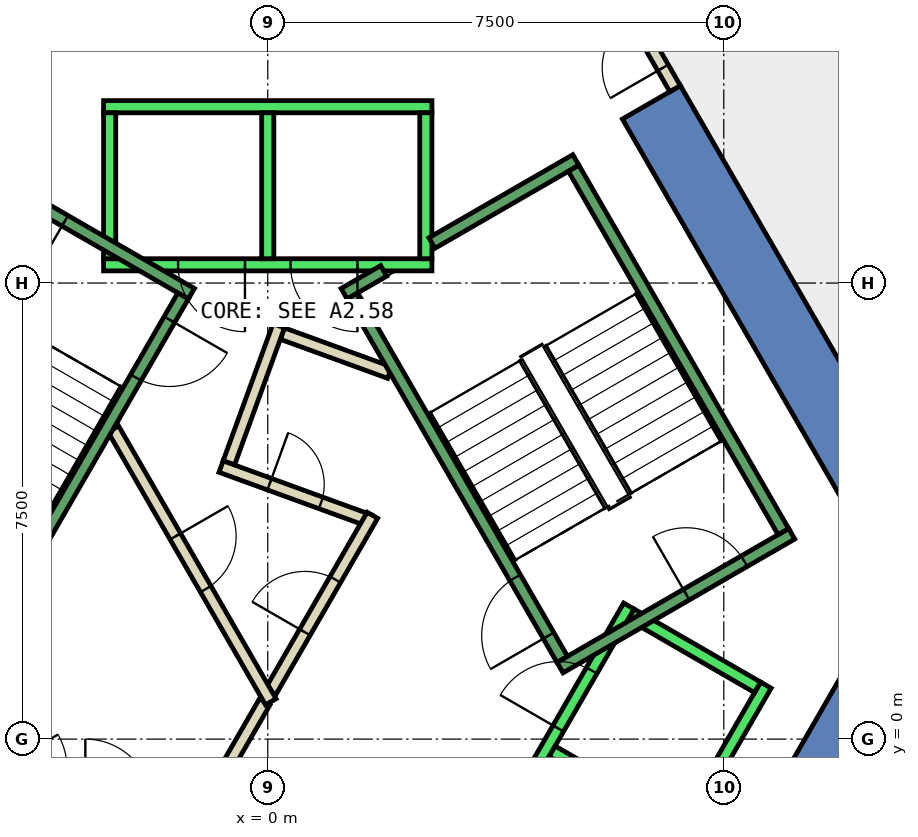
"""IFC4 building model, lengths in metres.
Left out: names, types, materials, properties, quantities, classifications, styles, units other than length and angle.
Written with IfcOpenShell. Run it as: python <this file> out.ifc"""

import sys

from ifc_helpers import new_model, si_unit, direction, frame, frame_2d, origin, place, context, subcontext, project, spatial, polyline, rectangle, outline, extrude, element, fill, save


model = new_model("IFC4")
c1 = context("Model", 3, precision=1e-05, world=origin(), true_north=direction((0.0, 1.0)))
c2 = subcontext(c1, "Body", "Model", "MODEL_VIEW")
j1 = project(units=[si_unit("LENGTHUNIT", "METRE"), si_unit("PLANEANGLEUNIT", "RADIAN")], contexts=[c1])
p1 = place(None, origin())
s1 = spatial("IfcSite", under=j1, at=p1, CompositionType="ELEMENT")
p2 = place(p1, origin())
s2 = spatial("IfcBuilding", under=s1, at=p2, CompositionType="ELEMENT")
p3 = place(p2, frame((0.0, 0.0, 273.8)))
s3 = spatial("IfcBuildingStorey", under=s2, at=p3, CompositionType="ELEMENT", Elevation=273.8)
p4 = place(p3, frame((0.0, 0.0, -0.34)))
e1 = element("IfcWall", 1, at=p4, inside=s3, PredefinedType="SHEAR", context=c2, shape_type="SweptSolid", body=[
    extrude(outline(polyline([(6.786, 10.747), (5.833, 10.197), (10.277, 2.5), (11.547, 2.5), (6.786, 10.747)])), origin(), (0.0, 0.0, 1.0), 3.6),
])
p5 = place(p3, frame((0.0, 0.0, -0.34)))
e2 = element("IfcWall", 2, at=p5, inside=s3, PredefinedType="SHEAR", context=c2, shape_type="SweptSolid", body=[
    extrude(outline(polyline([(5.774, -7.5), (11.547, 2.5), (10.277, 2.5), (5.138, -6.4), (5.774, -7.5)])), origin(), (0.0, 0.0, 1.0), 3.6),
])
p6 = place(p3, frame((2.005, 6.027, 0.0), z_axis=(0.0, 0.0, 1.0), x_axis=(-0.93978203596, 0.341774377167, 0.0)))
e3 = element("IfcWall", 3, at=p6, inside=s3, PredefinedType="PARTITIONING", context=c2, shape_type="SweptSolid", body=[
    extrude(rectangle(XDim=1.878, YDim=0.2, at=frame_2d((0.939, 0.0))), origin(), (0.0, 0.0, 1.0), 3.26),
])
p7 = place(p3, frame((0.181, 6.797, 0.0), z_axis=(0.0, 0.0, 1.0), x_axis=(-0.342020767299, -0.939692393678, 0.0)))
e4 = element("IfcWall", 4, at=p7, inside=s3, PredefinedType="PARTITIONING", context=c2, shape_type="SweptSolid", body=[
    extrude(rectangle(XDim=2.4, YDim=0.2, at=frame_2d((1.2, 0.0))), origin(), (0.0, 0.0, 1.0), 3.26),
])
p8 = place(p3, frame((-0.768, 4.482, 0.0), z_axis=(0.0, 0.0, 1.0), x_axis=(0.939664280748, -0.342097996905, 0.0)))
e5 = element("IfcWall", 5, at=p8, inside=s3, PredefinedType="PARTITIONING", context=c2, shape_type="SweptSolid", body=[
    extrude(rectangle(XDim=2.595, YDim=0.2, at=frame_2d((1.298, 0.0))), origin(), (0.0, 0.0, 1.0), 3.26),
])
p9 = place(p8, frame((0.848, 0.0, 0.0)))
e6 = element("IfcOpeningElement", 6, at=p9, cuts=e5, PredefinedType="OPENING", context=c2, shape_type="SweptSolid", body=[
    extrude(rectangle(XDim=0.9, YDim=2.1, at=frame_2d((0.45, 1.05))), frame((0.0, 0.11, 0.0), z_axis=(0.0, -1.0, 0.0), x_axis=(1.0, 0.0, 0.0)), (0.0, 0.0, 1.0), 0.22),
])
p10 = place(p3, frame((9.192, 12.643, 0.0), z_axis=(0.0, 0.0, 1.0), x_axis=(0.51491096884, -0.857243660909, 0.0)))
e7 = element("IfcWall", 7, at=p10, inside=s3, PredefinedType="PARTITIONING", context=c2, shape_type="SweptSolid", body=[
    extrude(rectangle(XDim=3.026, YDim=0.2, at=frame_2d((1.513, 0.0))), origin(), (0.0, 0.0, 1.0), 3.26),
])
p11 = place(p10, frame((1.012, 0.0, 0.0)))
e8 = element("IfcOpeningElement", 8, at=p11, cuts=e7, PredefinedType="OPENING", context=c2, shape_type="SweptSolid", body=[
    extrude(rectangle(XDim=1.0, YDim=2.1, at=frame_2d((0.5, 1.05))), frame((0.0, 0.11, 0.0), z_axis=(0.0, -1.0, 0.0), x_axis=(1.0, 0.0, 0.0)), (0.0, 0.0, 1.0), 0.22),
])
p12 = place(p3, frame((-0.982, -1.0, 0.0), z_axis=(0.0, 0.0, 1.0), x_axis=(0.50024047865, 0.865886518847, 0.0)))
e9 = element("IfcWall", 9, at=p12, inside=s3, PredefinedType="PARTITIONING", context=c2, shape_type="SweptSolid", body=[
    extrude(rectangle(XDim=1.863, YDim=0.2, at=frame_2d((0.931, 0.0))), origin(), (0.0, 0.0, 1.0), 3.26),
])
p13 = place(p3, frame((0.05, 0.787, 0.0), z_axis=(0.0, 0.0, 1.0), x_axis=(0.500036563046, 0.866004293071, 0.0)))
e10 = element("IfcWall", 10, at=p13, inside=s3, PredefinedType="PARTITIONING", context=c2, shape_type="SweptSolid", body=[
    extrude(rectangle(XDim=3.342, YDim=0.2, at=frame_2d((1.671, 0.0))), origin(), (0.0, 0.0, 1.0), 3.26),
])
p14 = place(p13, frame((1.121, 0.0, 0.0)))
e11 = element("IfcOpeningElement", 11, at=p14, cuts=e10, PredefinedType="OPENING", context=c2, shape_type="SweptSolid", body=[
    extrude(rectangle(XDim=1.0, YDim=2.1, at=frame_2d((0.5, 1.05))), frame((0.0, 0.11, 0.0), z_axis=(0.0, -1.0, 0.0), x_axis=(1.0, 0.0, 0.0)), (0.0, 0.0, 1.0), 0.22),
])
p15 = place(p3, frame((-2.54, 5.1, 0.0), z_axis=(0.0, 0.0, 1.0), x_axis=(0.499925051871, -0.866068670783, 0.0)))
e12 = element("IfcWall", 12, at=p15, inside=s3, PredefinedType="PARTITIONING", context=c2, shape_type="SweptSolid", body=[
    extrude(rectangle(XDim=5.181, YDim=0.2, at=frame_2d((2.59, 0.0))), origin(), (0.0, 0.0, 1.0), 3.26),
])
p16 = place(p15, frame((2.04, 0.0, 0.0)))
e13 = element("IfcOpeningElement", 13, at=p16, cuts=e12, PredefinedType="OPENING", context=c2, shape_type="SweptSolid", body=[
    extrude(rectangle(XDim=1.0, YDim=2.1, at=frame_2d((0.5, 1.05))), frame((0.0, 0.11, 0.0), z_axis=(0.0, -1.0, 0.0), x_axis=(1.0, 0.0, 0.0)), (0.0, 0.0, 1.0), 0.22),
])
p17 = place(p3, frame((6.699, 10.697, 0.0), z_axis=(0.0, 0.0, 1.0), x_axis=(-0.499914839587, 0.866074565589, 0.0)))
e14 = element("IfcWall", 14, at=p17, inside=s3, PredefinedType="PARTITIONING", context=c2, shape_type="SweptSolid", body=[
    extrude(rectangle(XDim=1.794, YDim=0.2, at=frame_2d((0.897, 0.0))), origin(), (0.0, 0.0, 1.0), 2.4),
])
p18 = place(p17, frame((0.397, 0.0, 0.0)))
e15 = element("IfcOpeningElement", 15, at=p18, cuts=e14, PredefinedType="OPENING", context=c2, shape_type="SweptSolid", body=[
    extrude(rectangle(XDim=1.0, YDim=2.1, at=frame_2d((0.5, 1.05))), frame((0.0, 0.11, 0.0), z_axis=(0.0, -1.0, 0.0), x_axis=(1.0, 0.0, 0.0)), (0.0, 0.0, 1.0), 0.22),
])
p19 = place(p3, frame((9.25, -4.879, 0.0), z_axis=(0.0, 0.0, 1.0), x_axis=(0.499999725187, 0.866025562448, 0.0)))
e16 = element("IfcWall", 16, at=p19, inside=s3, PredefinedType="PARTITIONING", context=c2, shape_type="SweptSolid", body=[
    extrude(rectangle(XDim=7.876, YDim=0.15, at=frame_2d((3.938, 0.0))), origin(), (0.0, 0.0, 1.0), 3.26),
])
p20 = place(p3, frame((2.7, 7.8, 0.0), z_axis=(0.0, 0.0, 1.0), x_axis=(-1.0, 0.0, 0.0)))
e17 = element("IfcWall", 17, at=p20, inside=s3, PredefinedType="STANDARD", context=c2, shape_type="SweptSolid", body=[
    extrude(rectangle(XDim=5.4, YDim=0.2, at=frame_2d((2.7, 0.0))), origin(), (0.0, 0.0, 1.0), 3.26),
])
p21 = place(p20, frame((1.225, 0.0, 0.0)))
e18 = element("IfcOpeningElement", 18, at=p21, cuts=e17, PredefinedType="OPENING", context=c2, shape_type="SweptSolid", body=[
    extrude(rectangle(XDim=1.1, YDim=2.1, at=frame_2d((0.55, 1.05))), frame((0.0, 0.11, 0.0), z_axis=(0.0, -1.0, 0.0), x_axis=(1.0, 0.0, 0.0)), (0.0, 0.0, 1.0), 0.22),
])
p22 = place(p20, frame((3.075, 0.0, 0.0)))
e19 = element("IfcOpeningElement", 19, at=p22, cuts=e17, PredefinedType="OPENING", context=c2, shape_type="SweptSolid", body=[
    extrude(rectangle(XDim=1.1, YDim=2.1, at=frame_2d((0.55, 1.05))), frame((0.0, 0.11, 0.0), z_axis=(0.0, -1.0, 0.0), x_axis=(1.0, 0.0, 0.0)), (0.0, 0.0, 1.0), 0.22),
])
p23 = place(p3, frame((2.7, 10.4, 0.0), z_axis=(0.0, 0.0, 1.0), x_axis=(-1.0, 0.0, 0.0)))
e20 = element("IfcWall", 20, at=p23, inside=s3, PredefinedType="STANDARD", context=c2, shape_type="SweptSolid", body=[
    extrude(rectangle(XDim=5.4, YDim=0.2, at=frame_2d((2.7, 0.0))), origin(), (0.0, 0.0, 1.0), 3.26),
])
for number, where, z_axis, x_axis in (
    (21, (2.6, 7.9, 0.0), (0.0, 0.0, 1.0), (0.0, 1.0, 0.0)),
    (22, (0.0, 7.9, 0.0), (0.0, 0.0, 1.0), (0.0, 1.0, 0.0)),
    (23, (-2.6, 7.9, 0.0), (0.0, 0.0, 1.0), (0.0, 1.0, 0.0)),
):
    element("IfcWall", number, at=place(p3, frame(where, z_axis=z_axis, x_axis=x_axis)), inside=s3, PredefinedType="STANDARD", context=c2, shape_type="SweptSolid", body=[
        extrude(rectangle(XDim=2.4, YDim=0.2, at=frame_2d((1.2, 0.0))), origin(), (0.0, 0.0, 1.0), 3.26),
    ])
p24 = place(p3, frame((-5.94, 2.188, 0.0), z_axis=(0.0, 0.0, 1.0), x_axis=(0.500034260056, -0.866005622828, 0.0)))
e24 = element("IfcWall", 24, at=p24, inside=s3, PredefinedType="STANDARD", context=c2, shape_type="SweptSolid", body=[
    extrude(rectangle(XDim=5.399, YDim=0.2, at=frame_2d((2.7, 0.0))), origin(), (0.0, 0.0, 1.0), 3.26),
])
p25 = place(p24, frame((3.075, 0.0, 0.0)))
e25 = element("IfcOpeningElement", 25, at=p25, cuts=e24, PredefinedType="OPENING", context=c2, shape_type="SweptSolid", body=[
    extrude(rectangle(XDim=1.1, YDim=2.1, at=frame_2d((0.55, 1.05))), frame((0.0, 0.11, 0.0), z_axis=(0.0, -1.0, 0.0), x_axis=(1.0, 0.0, 0.0)), (0.0, 0.0, 1.0), 0.22),
])
p26 = place(p24, frame((1.225, 0.0, 0.0)))
e26 = element("IfcOpeningElement", 26, at=p26, cuts=e24, PredefinedType="OPENING", context=c2, shape_type="SweptSolid", body=[
    extrude(rectangle(XDim=1.1, YDim=2.1, at=frame_2d((0.55, 1.05))), frame((0.0, 0.11, 0.0), z_axis=(0.0, -1.0, 0.0), x_axis=(1.0, 0.0, 0.0)), (0.0, 0.0, 1.0), 0.22),
])
p27 = place(p3, frame((3.24, -2.488, 0.0), z_axis=(0.0, 0.0, 1.0), x_axis=(0.500034260056, 0.866005622828, 0.0)))
e27 = element("IfcWall", 27, at=p27, inside=s3, PredefinedType="STANDARD", context=c2, shape_type="SweptSolid", body=[
    extrude(rectangle(XDim=5.399, YDim=0.2, at=frame_2d((2.7, 0.0))), origin(), (0.0, 0.0, 1.0), 3.26),
])
p28 = place(p27, frame((3.075, 0.0, 0.0)))
e28 = element("IfcOpeningElement", 28, at=p28, cuts=e27, PredefinedType="OPENING", context=c2, shape_type="SweptSolid", body=[
    extrude(rectangle(XDim=1.1, YDim=2.1, at=frame_2d((0.55, 1.05))), frame((0.0, 0.11, 0.0), z_axis=(0.0, -1.0, 0.0), x_axis=(1.0, 0.0, 0.0)), (0.0, 0.0, 1.0), 0.22),
])
p29 = place(p27, frame((1.225, 0.0, 0.0)))
e29 = element("IfcOpeningElement", 29, at=p29, cuts=e27, PredefinedType="OPENING", context=c2, shape_type="SweptSolid", body=[
    extrude(rectangle(XDim=1.1, YDim=2.1, at=frame_2d((0.55, 1.05))), frame((0.0, 0.11, 0.0), z_axis=(0.0, -1.0, 0.0), x_axis=(1.0, 0.0, 0.0)), (0.0, 0.0, 1.0), 0.22),
])
p30 = place(p3, frame((5.492, -3.788, 0.0), z_axis=(0.0, 0.0, 1.0), x_axis=(0.500034260056, 0.866005622828, 0.0)))
e30 = element("IfcWall", 30, at=p30, inside=s3, PredefinedType="STANDARD", context=c2, shape_type="SweptSolid", body=[
    extrude(rectangle(XDim=5.399, YDim=0.2, at=frame_2d((2.7, 0.0))), origin(), (0.0, 0.0, 1.0), 3.26),
])
for number, where, z_axis, x_axis in (
    (31, (4.677, -0.2, 0.0), (0.0, 0.0, 1.0), (0.866, -0.5, 0.0)),
    (32, (5.977, 2.052, 0.0), (0.0, 0.0, 1.0), (0.866, -0.5, 0.0)),
):
    element("IfcWall", number, at=place(p3, frame(where, z_axis=z_axis, x_axis=x_axis)), inside=s3, PredefinedType="STANDARD", context=c2, shape_type="SweptSolid", body=[
        extrude(rectangle(XDim=2.399, YDim=0.2, at=frame_2d((1.2, 0.0))), origin(), (0.0, 0.0, 1.0), 3.26),
    ])
p31 = place(p3, frame((4.806, 1.176, 0.0), z_axis=(0.0, 0.0, 1.0), x_axis=(0.866059941101, 0.499940174841, 0.0)))
e33 = element("IfcWall", 33, at=p31, inside=s3, PredefinedType="STANDARD", context=c2, shape_type="SweptSolid", body=[
    extrude(rectangle(XDim=4.4, YDim=0.2, at=frame_2d((2.2, 0.0))), origin(), (0.0, 0.0, 1.0), 3.26),
])
p32 = place(p31, frame((2.4, 0.0, 0.0)))
e34 = element("IfcOpeningElement", 34, at=p32, cuts=e33, PredefinedType="OPENING", context=c2, shape_type="SweptSolid", body=[
    extrude(rectangle(XDim=1.1, YDim=2.2, at=frame_2d((0.55, 1.1))), frame((0.0, 0.11, 0.0), z_axis=(0.0, -1.0, 0.0), x_axis=(1.0, 0.0, 0.0)), (0.0, 0.0, 1.0), 0.22),
])
p33 = place(p3, frame((2.7, 8.158, 0.0), z_axis=(0.0, 0.0, 1.0), x_axis=(0.86611865017, 0.499838457731, 0.0)))
e35 = element("IfcWall", 35, at=p33, inside=s3, PredefinedType="STANDARD", context=c2, shape_type="SweptSolid", body=[
    extrude(rectangle(XDim=2.733, YDim=0.2, at=frame_2d((1.366, 0.0))), origin(), (0.0, 0.0, 1.0), 3.26),
])
p34 = place(p3, frame((1.256, 7.324, 0.0), z_axis=(0.0, 0.0, 1.0), x_axis=(0.865915093549, 0.500191014278, 0.0)))
e36 = element("IfcWall", 36, at=p34, inside=s3, PredefinedType="STANDARD", context=c2, shape_type="SweptSolid", body=[
    extrude(rectangle(XDim=0.752, YDim=0.2, at=frame_2d((0.376, 0.0))), origin(), (0.0, 0.0, 1.0), 3.26),
])
p35 = place(p3, frame((4.843, 1.312, 0.0), z_axis=(0.0, 0.0, 1.0), x_axis=(-0.499963383562, 0.866046543262, 0.0)))
e37 = element("IfcWall", 37, at=p35, inside=s3, PredefinedType="STANDARD", context=c2, shape_type="SweptSolid", body=[
    extrude(rectangle(XDim=6.9, YDim=0.2, at=frame_2d((3.45, 0.0))), origin(), (0.0, 0.0, 1.0), 3.26),
])
p36 = place(p35, frame((0.45, 0.0, 0.0)))
e38 = element("IfcOpeningElement", 38, at=p36, cuts=e37, PredefinedType="OPENING", context=c2, shape_type="SweptSolid", body=[
    extrude(rectangle(XDim=1.1, YDim=2.2, at=frame_2d((0.55, 1.1))), frame((0.0, 0.11, 0.0), z_axis=(0.0, -1.0, 0.0), x_axis=(1.0, 0.0, 0.0)), (0.0, 0.0, 1.0), 0.22),
])
p37 = place(p3, frame((8.48, 3.412, 0.0), z_axis=(0.0, 0.0, 1.0), x_axis=(-0.499978703459, 0.866037698999, 0.0)))
e39 = element("IfcWall", 39, at=p37, inside=s3, PredefinedType="STANDARD", context=c2, shape_type="SweptSolid", body=[
    extrude(rectangle(XDim=6.9, YDim=0.2, at=frame_2d((3.45, 0.0))), origin(), (0.0, 0.0, 1.0), 3.26),
])
p38 = place(p3, frame((-1.256, 7.324, 0.0), z_axis=(0.0, 0.0, 1.0), x_axis=(-0.866046073146, 0.499964197906, 0.0)))
e40 = element("IfcWall", 40, at=p38, inside=s3, PredefinedType="STANDARD", context=c2, shape_type="SweptSolid", body=[
    extrude(rectangle(XDim=4.4, YDim=0.2, at=frame_2d((2.2, 0.0))), origin(), (0.0, 0.0, 1.0), 3.26),
])
p39 = place(p38, frame((2.4, 0.0, 0.0)))
e41 = element("IfcOpeningElement", 41, at=p39, cuts=e40, PredefinedType="OPENING", context=c2, shape_type="SweptSolid", body=[
    extrude(rectangle(XDim=1.1, YDim=2.2, at=frame_2d((0.55, 1.1))), frame((0.0, 0.11, 0.0), z_axis=(0.0, -1.0, 0.0), x_axis=(1.0, 0.0, 0.0)), (0.0, 0.0, 1.0), 0.22),
])
p40 = place(p3, frame((-1.393, 7.288, 0.0), z_axis=(0.0, 0.0, 1.0), x_axis=(-0.499963383562, -0.866046543262, 0.0)))
e42 = element("IfcWall", 42, at=p40, inside=s3, PredefinedType="STANDARD", context=c2, shape_type="SweptSolid", body=[
    extrude(rectangle(XDim=6.9, YDim=0.2, at=frame_2d((3.45, 0.0))), origin(), (0.0, 0.0, 1.0), 3.26),
])
p41 = place(p40, frame((0.45, 0.0, 0.0)))
e43 = element("IfcOpeningElement", 43, at=p41, cuts=e42, PredefinedType="OPENING", context=c2, shape_type="SweptSolid", body=[
    extrude(rectangle(XDim=1.1, YDim=2.2, at=frame_2d((0.55, 1.1))), frame((0.0, 0.11, 0.0), z_axis=(0.0, -1.0, 0.0), x_axis=(1.0, 0.0, 0.0)), (0.0, 0.0, 1.0), 0.22),
])
p42 = place(p14, origin())
e44 = element("IfcDoor", 44, at=p42, inside=s3, OperationType="SINGLE_SWING_LEFT", PredefinedType="DOOR", context=c2, shape_type="SweptSolid", body=[
    extrude(rectangle(XDim=1.0, YDim=2.1, at=frame_2d((0.5, 1.05))), frame((0.0, 0.025, 0.0), z_axis=(0.0, -1.0, 0.0), x_axis=(1.0, 0.0, 0.0)), (0.0, 0.0, 1.0), 0.05),
])
fill(e11, e44)
p43 = place(p16, origin())
e45 = element("IfcDoor", 45, at=p43, inside=s3, OperationType="SINGLE_SWING_LEFT", PredefinedType="DOOR", context=c2, shape_type="SweptSolid", body=[
    extrude(rectangle(XDim=1.0, YDim=2.1, at=frame_2d((0.5, 1.05))), frame((0.0, 0.025, 0.0), z_axis=(0.0, -1.0, 0.0), x_axis=(1.0, 0.0, 0.0)), (0.0, 0.0, 1.0), 0.05),
])
fill(e13, e45)
p44 = place(p9, origin())
e46 = element("IfcDoor", 46, at=p44, inside=s3, OperationType="SINGLE_SWING_LEFT", PredefinedType="DOOR", context=c2, shape_type="SweptSolid", body=[
    extrude(rectangle(XDim=0.9, YDim=2.1, at=frame_2d((0.45, 1.05))), frame((0.0, 0.025, 0.0), z_axis=(0.0, -1.0, 0.0), x_axis=(1.0, 0.0, 0.0)), (0.0, 0.0, 1.0), 0.05),
])
fill(e6, e46)
p45 = place(p18, origin())
e47 = element("IfcDoor", 47, at=p45, inside=s3, OperationType="SINGLE_SWING_LEFT", PredefinedType="DOOR", context=c2, shape_type="SweptSolid", body=[
    extrude(rectangle(XDim=1.0, YDim=2.1, at=frame_2d((0.5, 1.05))), frame((0.0, 0.025, 0.0), z_axis=(0.0, -1.0, 0.0), x_axis=(1.0, 0.0, 0.0)), (0.0, 0.0, 1.0), 0.05),
])
fill(e15, e47)
p46 = place(p21, origin())
e48 = element("IfcDoor", 48, at=p46, inside=s3, OperationType="SLIDING_TO_LEFT", PredefinedType="DOOR", context=c2, shape_type="SweptSolid", body=[
    extrude(rectangle(XDim=1.1, YDim=2.1, at=frame_2d((0.55, 1.05))), frame((0.0, 0.025, 0.0), z_axis=(0.0, -1.0, 0.0), x_axis=(1.0, 0.0, 0.0)), (0.0, 0.0, 1.0), 0.05),
])
fill(e18, e48)
p47 = place(p22, origin())
e49 = element("IfcDoor", 49, at=p47, inside=s3, OperationType="SLIDING_TO_LEFT", PredefinedType="DOOR", context=c2, shape_type="SweptSolid", body=[
    extrude(rectangle(XDim=1.1, YDim=2.1, at=frame_2d((0.55, 1.05))), frame((0.0, 0.025, 0.0), z_axis=(0.0, -1.0, 0.0), x_axis=(1.0, 0.0, 0.0)), (0.0, 0.0, 1.0), 0.05),
])
fill(e19, e49)
p48 = place(p28, origin())
e50 = element("IfcDoor", 50, at=p48, inside=s3, OperationType="SLIDING_TO_LEFT", PredefinedType="DOOR", context=c2, shape_type="SweptSolid", body=[
    extrude(rectangle(XDim=1.1, YDim=2.1, at=frame_2d((0.55, 1.05))), frame((0.0, 0.025, 0.0), z_axis=(0.0, -1.0, 0.0), x_axis=(1.0, 0.0, 0.0)), (0.0, 0.0, 1.0), 0.05),
])
fill(e28, e50)
p49 = place(p36, origin())
e51 = element("IfcDoor", 51, at=p49, inside=s3, OperationType="SINGLE_SWING_LEFT", PredefinedType="DOOR", context=c2, shape_type="SweptSolid", body=[
    extrude(rectangle(XDim=1.1, YDim=2.2, at=frame_2d((0.55, 1.1))), frame((0.0, 0.025, 0.0), z_axis=(0.0, -1.0, 0.0), x_axis=(1.0, 0.0, 0.0)), (0.0, 0.0, 1.0), 0.05),
])
fill(e38, e51)
p50 = place(p32, origin())
e52 = element("IfcDoor", 52, at=p50, inside=s3, OperationType="SINGLE_SWING_LEFT", PredefinedType="DOOR", context=c2, shape_type="SweptSolid", body=[
    extrude(rectangle(XDim=1.1, YDim=2.2, at=frame_2d((0.55, 1.1))), frame((0.0, 0.025, 0.0), z_axis=(0.0, -1.0, 0.0), x_axis=(1.0, 0.0, 0.0)), (0.0, 0.0, 1.0), 0.05),
])
fill(e34, e52)
p51 = place(p41, origin())
e53 = element("IfcDoor", 53, at=p51, inside=s3, OperationType="SINGLE_SWING_LEFT", PredefinedType="DOOR", context=c2, shape_type="SweptSolid", body=[
    extrude(rectangle(XDim=1.1, YDim=2.2, at=frame_2d((0.55, 1.1))), frame((0.0, 0.025, 0.0), z_axis=(0.0, -1.0, 0.0), x_axis=(1.0, 0.0, 0.0)), (0.0, 0.0, 1.0), 0.05),
])
fill(e43, e53)
p52 = place(p39, origin())
e54 = element("IfcDoor", 54, at=p52, inside=s3, OperationType="SINGLE_SWING_LEFT", PredefinedType="DOOR", context=c2, shape_type="SweptSolid", body=[
    extrude(rectangle(XDim=1.1, YDim=2.2, at=frame_2d((0.55, 1.1))), frame((0.0, 0.025, 0.0), z_axis=(0.0, -1.0, 0.0), x_axis=(1.0, 0.0, 0.0)), (0.0, 0.0, 1.0), 0.05),
])
fill(e41, e54)
save(model, sys.argv[1])
